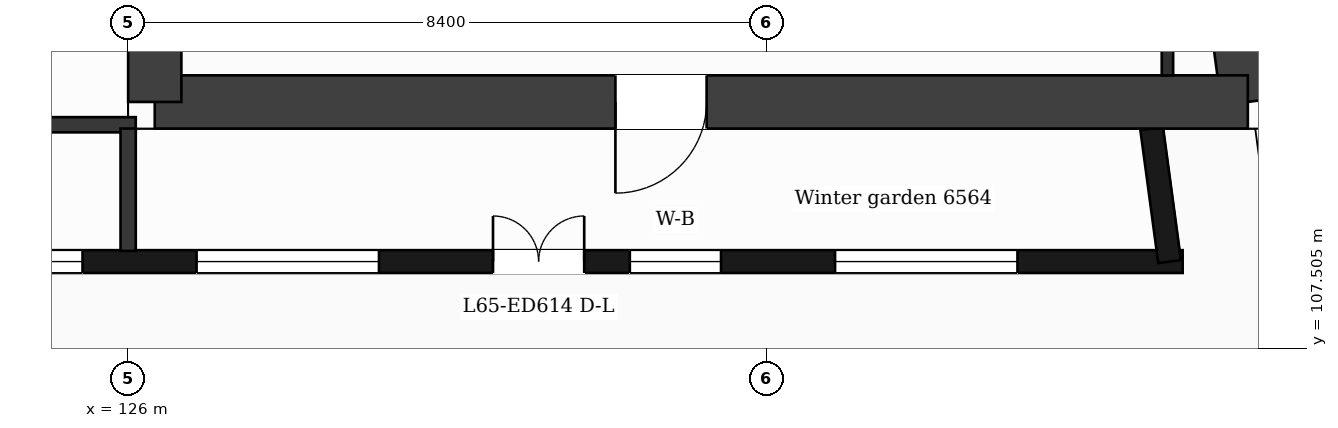
"""IFC4 building model, lengths in metres.
Left out: names, types, materials, properties, quantities, classifications, styles, units other than length and angle.
Written with IfcOpenShell. Run it as: python <this file> out.ifc"""

import sys

from ifc_helpers import new_model, si_unit, direction, frame, frame_2d, origin, place, context, subcontext, project, spatial, rectangle, extrude, element, fill, save


model = new_model("IFC4")
c1 = context("Model", 3, precision=1e-05, world=origin(), true_north=direction((0.0, 1.0)))
c2 = subcontext(c1, "Body", "Model", "MODEL_VIEW")
j1 = project(units=[si_unit("LENGTHUNIT", "METRE"), si_unit("PLANEANGLEUNIT", "RADIAN")], contexts=[c1])
p1 = place(None, origin())
s1 = spatial("IfcSite", under=j1, at=p1, CompositionType="ELEMENT")
p2 = place(p1, origin())
s2 = spatial("IfcBuilding", under=s1, at=p2, CompositionType="ELEMENT")
p3 = place(p2, frame((0.0, 0.0, 270.1)))
s3 = spatial("IfcBuildingStorey", under=s2, at=p3, CompositionType="ELEMENT", Elevation=270.1)
p4 = place(p3, frame((137.863, 132.05, 0.0), z_axis=(0.0, 0.0, 1.0), x_axis=(0.133406218907, -0.991061441464, 0.0)))
e1 = element("IfcWall", 1, at=p4, inside=s3, PredefinedType="SHEAR", context=c2, shape_type="SweptSolid", body=[
    extrude(rectangle(XDim=21.492, YDim=0.7, at=frame_2d((10.746, 0.0))), origin(), (0.0, 0.0, 1.0), 3.7),
])
p5 = place(p3, frame((140.73, 110.75, 0.0), z_axis=(0.0, 0.0, 1.0), x_axis=(-1.0, 0.0, 0.0)))
e2 = element("IfcWall", 2, at=p5, inside=s3, PredefinedType="SHEAR", context=c2, shape_type="SweptSolid", body=[
    extrude(rectangle(XDim=14.38, YDim=0.7, at=frame_2d((7.19, 0.0))), origin(), (0.0, 0.0, 1.0), 3.7),
])
p6 = place(p5, frame((7.12, 0.0, 0.0)))
e3 = element("IfcOpeningElement", 3, at=p6, cuts=e2, PredefinedType="OPENING", context=c2, shape_type="SweptSolid", body=[
    extrude(rectangle(XDim=1.2, YDim=2.1, at=frame_2d((0.6, 1.05))), frame((0.0, 0.36, 0.0), z_axis=(0.0, -1.0, 0.0), x_axis=(1.0, 0.0, 0.0)), (0.0, 0.0, 1.0), 0.72),
])
p7 = place(p3, frame((126.35, 110.75, 0.0), z_axis=(0.0, 0.0, 1.0), x_axis=(0.0, 1.0, 0.0)))
e4 = element("IfcWall", 4, at=p7, inside=s3, PredefinedType="SHEAR", context=c2, shape_type="SweptSolid", body=[
    extrude(rectangle(XDim=21.3, YDim=0.7, at=frame_2d((10.65, 0.0))), origin(), (0.0, 0.0, 1.0), 3.7),
])
p8 = place(p7, frame((12.0, 0.0, 0.0)))
e5 = element("IfcOpeningElement", 5, at=p8, cuts=e4, PredefinedType="OPENING", context=c2, shape_type="SweptSolid", body=[
    extrude(rectangle(XDim=1.4, YDim=2.1, at=frame_2d((0.7, 1.05))), frame((0.0, 0.36, 0.0), z_axis=(0.0, -1.0, 0.0), x_axis=(1.0, 0.0, 0.0)), (0.0, 0.0, 1.0), 0.72),
])
p9 = place(p3, frame((87.099, 108.65, 0.0), z_axis=(0.0, 0.0, 1.0), x_axis=(1.0, 0.0, 0.0)))
e6 = element("IfcWall", 6, at=p9, inside=s3, PredefinedType="SOLIDWALL", context=c2, shape_type="SweptSolid", body=[
    extrude(rectangle(XDim=52.774, YDim=0.3, at=frame_2d((26.387, 0.0))), origin(), (0.0, 0.0, 1.0), 3.38),
])
p10 = place(p9, frame((2.602, 0.0, 0.9)))
e7 = element("IfcOpeningElement", 7, at=p10, cuts=e6, PredefinedType="OPENING", context=c2, shape_type="SweptSolid", body=[
    extrude(rectangle(XDim=1.2, YDim=2.1, at=frame_2d((0.6, 1.05))), frame((0.0, 0.16, 0.0), z_axis=(0.0, -1.0, 0.0), x_axis=(1.0, 0.0, 0.0)), (0.0, 0.0, 1.0), 0.32),
])
p11 = place(p9, frame((6.201, 0.0, 0.9)))
e8 = element("IfcOpeningElement", 8, at=p11, cuts=e6, PredefinedType="OPENING", context=c2, shape_type="SweptSolid", body=[
    extrude(rectangle(XDim=2.4, YDim=2.1, at=frame_2d((1.2, 1.05))), frame((0.0, 0.16, 0.0), z_axis=(0.0, -1.0, 0.0), x_axis=(1.0, 0.0, 0.0)), (0.0, 0.0, 1.0), 0.32),
])
p12 = place(p9, frame((10.401, 0.0, 0.9)))
e9 = element("IfcOpeningElement", 9, at=p12, cuts=e6, PredefinedType="OPENING", context=c2, shape_type="SweptSolid", body=[
    extrude(rectangle(XDim=2.4, YDim=2.1, at=frame_2d((1.2, 1.05))), frame((0.0, 0.16, 0.0), z_axis=(0.0, -1.0, 0.0), x_axis=(1.0, 0.0, 0.0)), (0.0, 0.0, 1.0), 0.32),
])
p13 = place(p9, frame((14.602, 0.0, 0.9)))
e10 = element("IfcOpeningElement", 10, at=p13, cuts=e6, PredefinedType="OPENING", context=c2, shape_type="SweptSolid", body=[
    extrude(rectangle(XDim=2.4, YDim=2.1, at=frame_2d((1.2, 1.05))), frame((0.0, 0.16, 0.0), z_axis=(0.0, -1.0, 0.0), x_axis=(1.0, 0.0, 0.0)), (0.0, 0.0, 1.0), 0.32),
])
p14 = place(p9, frame((18.802, 0.0, 0.9)))
e11 = element("IfcOpeningElement", 11, at=p14, cuts=e6, PredefinedType="OPENING", context=c2, shape_type="SweptSolid", body=[
    extrude(rectangle(XDim=2.4, YDim=2.1, at=frame_2d((1.2, 1.05))), frame((0.0, 0.16, 0.0), z_axis=(0.0, -1.0, 0.0), x_axis=(1.0, 0.0, 0.0)), (0.0, 0.0, 1.0), 0.32),
])
p15 = place(p9, frame((23.001, 0.0, 0.9)))
e12 = element("IfcOpeningElement", 12, at=p15, cuts=e6, PredefinedType="OPENING", context=c2, shape_type="SweptSolid", body=[
    extrude(rectangle(XDim=2.4, YDim=2.1, at=frame_2d((1.2, 1.05))), frame((0.0, 0.16, 0.0), z_axis=(0.0, -1.0, 0.0), x_axis=(1.0, 0.0, 0.0)), (0.0, 0.0, 1.0), 0.32),
])
p16 = place(p9, frame((27.802, 0.0, 0.9)))
e13 = element("IfcOpeningElement", 13, at=p16, cuts=e6, PredefinedType="OPENING", context=c2, shape_type="SweptSolid", body=[
    extrude(rectangle(XDim=1.2, YDim=2.1, at=frame_2d((0.6, 1.05))), frame((0.0, 0.16, 0.0), z_axis=(0.0, -1.0, 0.0), x_axis=(1.0, 0.0, 0.0)), (0.0, 0.0, 1.0), 0.32),
])
p17 = place(p9, frame((32.001, 0.0, 0.9)))
e14 = element("IfcOpeningElement", 14, at=p17, cuts=e6, PredefinedType="OPENING", context=c2, shape_type="SweptSolid", body=[
    extrude(rectangle(XDim=1.2, YDim=2.1, at=frame_2d((0.6, 1.05))), frame((0.0, 0.16, 0.0), z_axis=(0.0, -1.0, 0.0), x_axis=(1.0, 0.0, 0.0)), (0.0, 0.0, 1.0), 0.32),
])
p18 = place(p9, frame((35.302, 0.0, 0.0)))
e15 = element("IfcOpeningElement", 15, at=p18, cuts=e6, PredefinedType="OPENING", context=c2, shape_type="SweptSolid", body=[
    extrude(rectangle(XDim=1.2, YDim=2.4, at=frame_2d((0.6, 1.2))), frame((0.0, 0.16, 0.0), z_axis=(0.0, -1.0, 0.0), x_axis=(1.0, 0.0, 0.0)), (0.0, 0.0, 1.0), 0.32),
])
p19 = place(p9, frame((37.102, 0.0, 0.9)))
e16 = element("IfcOpeningElement", 16, at=p19, cuts=e6, PredefinedType="OPENING", context=c2, shape_type="SweptSolid", body=[
    extrude(rectangle(XDim=1.2, YDim=2.1, at=frame_2d((0.6, 1.05))), frame((0.0, 0.16, 0.0), z_axis=(0.0, -1.0, 0.0), x_axis=(1.0, 0.0, 0.0)), (0.0, 0.0, 1.0), 0.32),
])
p20 = place(p9, frame((39.802, 0.0, 0.9)))
e17 = element("IfcOpeningElement", 17, at=p20, cuts=e6, PredefinedType="OPENING", context=c2, shape_type="SweptSolid", body=[
    extrude(rectangle(XDim=2.4, YDim=2.1, at=frame_2d((1.2, 1.05))), frame((0.0, 0.16, 0.0), z_axis=(0.0, -1.0, 0.0), x_axis=(1.0, 0.0, 0.0)), (0.0, 0.0, 1.0), 0.32),
])
p21 = place(p9, frame((43.701, 0.0, 0.0)))
e18 = element("IfcOpeningElement", 18, at=p21, cuts=e6, PredefinedType="OPENING", context=c2, shape_type="SweptSolid", body=[
    extrude(rectangle(XDim=1.2, YDim=2.4, at=frame_2d((0.6, 1.2))), frame((0.0, 0.16, 0.0), z_axis=(0.0, -1.0, 0.0), x_axis=(1.0, 0.0, 0.0)), (0.0, 0.0, 1.0), 0.32),
])
p22 = place(p9, frame((45.501, 0.0, 0.9)))
e19 = element("IfcOpeningElement", 19, at=p22, cuts=e6, PredefinedType="OPENING", context=c2, shape_type="SweptSolid", body=[
    extrude(rectangle(XDim=1.2, YDim=2.1, at=frame_2d((0.6, 1.05))), frame((0.0, 0.16, 0.0), z_axis=(0.0, -1.0, 0.0), x_axis=(1.0, 0.0, 0.0)), (0.0, 0.0, 1.0), 0.32),
])
p23 = place(p9, frame((48.201, 0.0, 0.9)))
e20 = element("IfcOpeningElement", 20, at=p23, cuts=e6, PredefinedType="OPENING", context=c2, shape_type="SweptSolid", body=[
    extrude(rectangle(XDim=2.4, YDim=2.1, at=frame_2d((1.2, 1.05))), frame((0.0, 0.16, 0.0), z_axis=(0.0, -1.0, 0.0), x_axis=(1.0, 0.0, 0.0)), (0.0, 0.0, 1.0), 0.32),
])
p24 = place(p3, frame((139.701, 108.65, 0.0), z_axis=(0.0, 0.0, 1.0), x_axis=(-0.133422458344, 0.991059255347, 0.0)))
e21 = element("IfcWall", 21, at=p24, inside=s3, PredefinedType="SOLIDWALL", context=c2, shape_type="SweptSolid", body=[
    extrude(rectangle(XDim=1.766, YDim=0.3, at=frame_2d((0.883, 0.0))), origin(), (0.0, 0.0, 1.0), 3.38),
])
p25 = place(p3, frame((100.7, 110.45, 0.0), z_axis=(0.0, 0.0, 1.0), x_axis=(1.0, 0.0, 0.0)))
e22 = element("IfcWall", 22, at=p25, inside=s3, PredefinedType="PARTITIONING", context=c2, shape_type="SweptSolid", body=[
    extrude(rectangle(XDim=25.4, YDim=0.2, at=frame_2d((12.7, 0.0))), origin(), (0.0, 0.0, 1.0), 3.38),
])
p26 = place(p3, frame((126.0, 108.79, 0.0), z_axis=(0.0, 0.0, 1.0), x_axis=(0.0, 1.0, 0.0)))
e23 = element("IfcWall", 23, at=p26, inside=s3, PredefinedType="PARTITIONING", context=c2, shape_type="SweptSolid", body=[
    extrude(rectangle(XDim=1.61, YDim=0.2, at=frame_2d((0.805, 0.0))), origin(), (0.0, 0.0, 1.0), 3.38),
])
p27 = place(p3, frame((139.673, 111.1, 0.0), z_axis=(0.0, 0.0, 1.0), x_axis=(0.0, 1.0, 0.0)))
e24 = element("IfcWall", 24, at=p27, inside=s3, PredefinedType="PARTITIONING", context=c2, shape_type="SweptSolid", body=[
    extrude(rectangle(XDim=1.8, YDim=0.15, at=frame_2d((0.9, 0.0))), origin(), (0.0, 0.0, 1.0), 3.38),
])
p28 = place(p19, origin())
e25 = element("IfcWindow", 25, at=p28, inside=s3, PartitioningType="SINGLE_PANEL", PredefinedType="WINDOW", context=c2, shape_type="SweptSolid", body=[
    extrude(rectangle(XDim=1.2, YDim=2.1, at=frame_2d((0.6, 1.05))), frame((0.0, 0.03, 0.0), z_axis=(0.0, -1.0, 0.0), x_axis=(1.0, 0.0, 0.0)), (0.0, 0.0, 1.0), 0.06),
])
fill(e16, e25)
p29 = place(p20, origin())
e26 = element("IfcWindow", 26, at=p29, inside=s3, PartitioningType="SINGLE_PANEL", PredefinedType="WINDOW", context=c2, shape_type="SweptSolid", body=[
    extrude(rectangle(XDim=2.4, YDim=2.1, at=frame_2d((1.2, 1.05))), frame((0.0, 0.03, 0.0), z_axis=(0.0, -1.0, 0.0), x_axis=(1.0, 0.0, 0.0)), (0.0, 0.0, 1.0), 0.06),
])
fill(e17, e26)
p30 = place(p21, origin())
e27 = element("IfcDoor", 27, at=p30, inside=s3, OperationType="DOUBLE_DOOR_SINGLE_SWING", PredefinedType="DOOR", context=c2, shape_type="SweptSolid", body=[
    extrude(rectangle(XDim=1.2, YDim=2.4, at=frame_2d((0.6, 1.2))), frame((0.0, 0.025, 0.0), z_axis=(0.0, -1.0, 0.0), x_axis=(1.0, 0.0, 0.0)), (0.0, 0.0, 1.0), 0.05),
])
fill(e18, e27)
p31 = place(p22, origin())
e28 = element("IfcWindow", 28, at=p31, inside=s3, PartitioningType="SINGLE_PANEL", PredefinedType="WINDOW", context=c2, shape_type="SweptSolid", body=[
    extrude(rectangle(XDim=1.2, YDim=2.1, at=frame_2d((0.6, 1.05))), frame((0.0, 0.03, 0.0), z_axis=(0.0, -1.0, 0.0), x_axis=(1.0, 0.0, 0.0)), (0.0, 0.0, 1.0), 0.06),
])
fill(e19, e28)
p32 = place(p23, origin())
e29 = element("IfcWindow", 29, at=p32, inside=s3, PartitioningType="SINGLE_PANEL", PredefinedType="WINDOW", context=c2, shape_type="SweptSolid", body=[
    extrude(rectangle(XDim=2.4, YDim=2.1, at=frame_2d((1.2, 1.05))), frame((0.0, 0.03, 0.0), z_axis=(0.0, -1.0, 0.0), x_axis=(1.0, 0.0, 0.0)), (0.0, 0.0, 1.0), 0.06),
])
fill(e20, e29)
p33 = place(p6, origin())
e30 = element("IfcDoor", 30, at=p33, inside=s3, OperationType="SINGLE_SWING_RIGHT", PredefinedType="DOOR", context=c2, shape_type="SweptSolid", body=[
    extrude(rectangle(XDim=1.2, YDim=2.1, at=frame_2d((0.6, 1.05))), frame((0.0, 0.025, 0.0), z_axis=(0.0, -1.0, 0.0), x_axis=(1.0, 0.0, 0.0)), (0.0, 0.0, 1.0), 0.05),
])
fill(e3, e30)
save(model, sys.argv[1])
